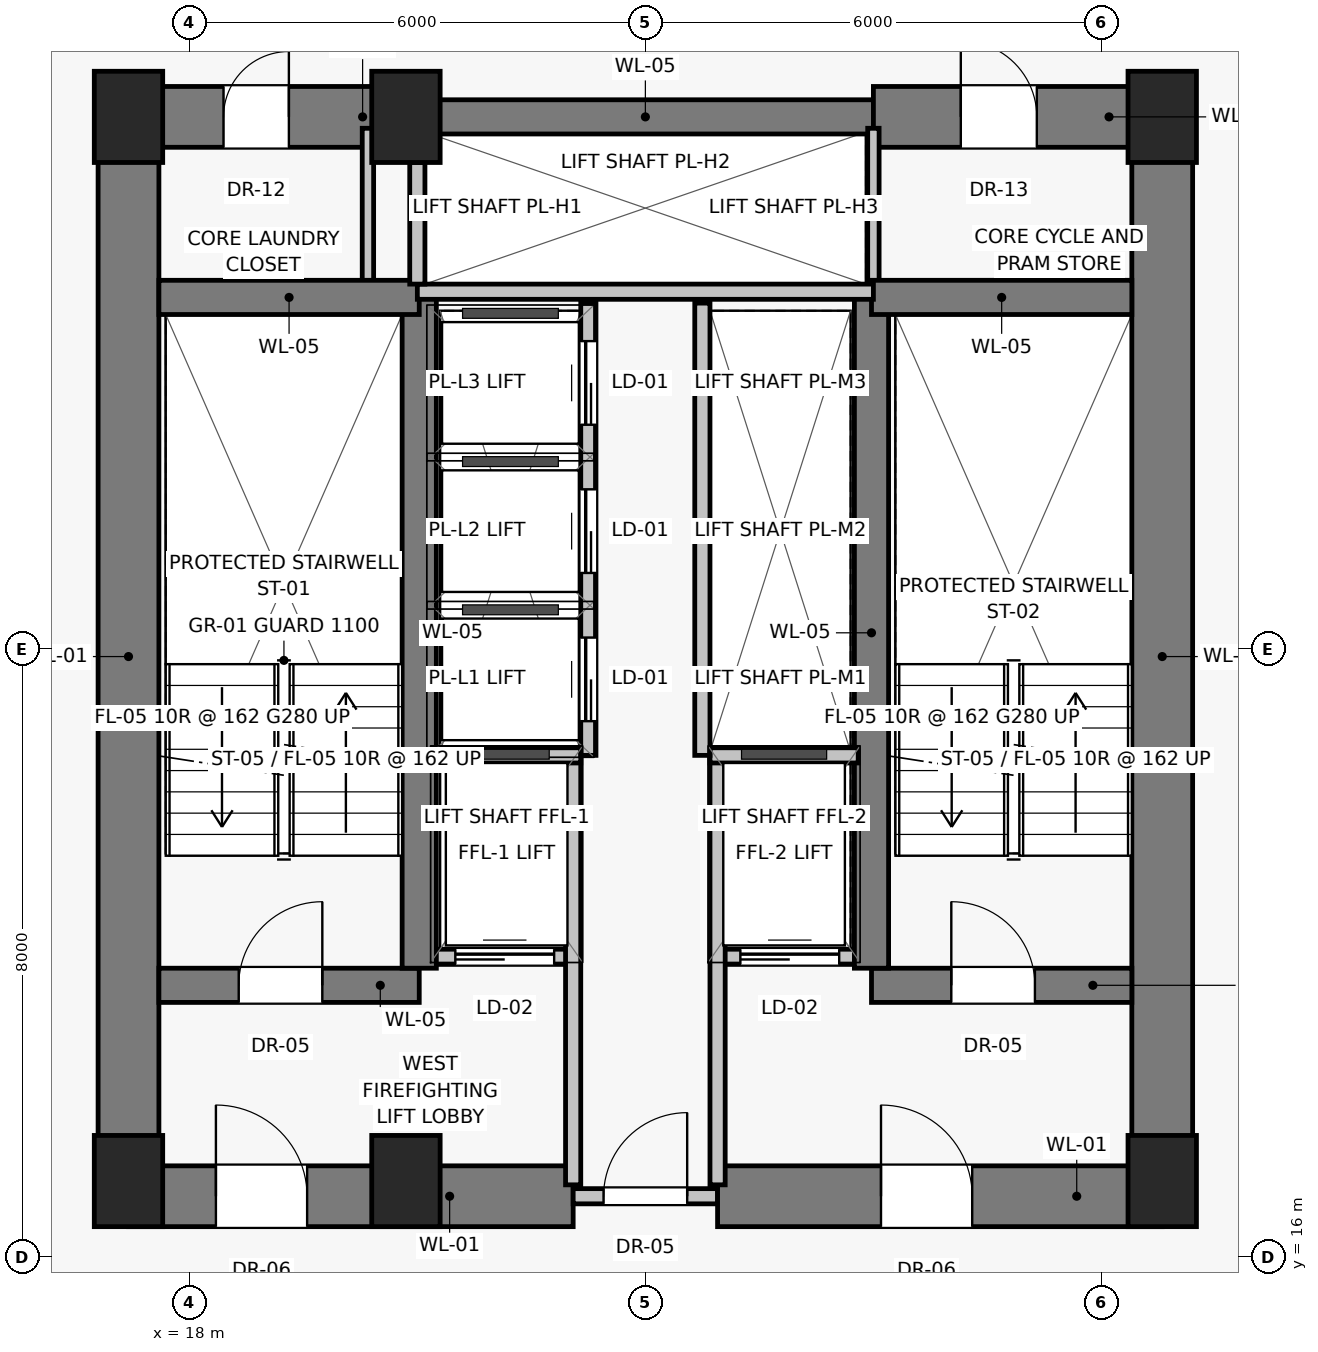
"""IFC4 building model, lengths in metres.
Left out: names, types, materials, properties, quantities, classifications, styles, units other than length and angle.
Written with IfcOpenShell. Run it as: python <this file> out.ifc"""

import sys

from ifc_helpers import new_model, si_unit, direction, frame, frame_2d, origin, origin_2d, place, context, subcontext, project, spatial, rectangle, extrude, source, transform, mapped, element, fill, save


model = new_model("IFC4")
c1 = context("Model", 3, precision=1e-05, world=origin(), true_north=direction((0.0, 1.0)))
c2 = subcontext(c1, "Body", "Model", "MODEL_VIEW")
j1 = project(units=[si_unit("LENGTHUNIT", "METRE"), si_unit("PLANEANGLEUNIT", "RADIAN")], contexts=[c1])
p1 = place(None, origin())
s1 = spatial("IfcSite", under=j1, at=p1, CompositionType="ELEMENT")
p2 = place(p1, origin())
s2 = spatial("IfcBuilding", under=s1, at=p2, CompositionType="ELEMENT")
p3 = place(p2, frame((0.0, 0.0, 70.6)))
s3 = spatial("IfcBuildingStorey", under=s2, at=p3, CompositionType="ELEMENT", Elevation=70.6)
for number, where, z_axis, x_axis in (
    (1, (17.2, 17.0, 0.0), (0.0, 0.0, 1.0), (1.0, 0.0, 0.0)),
    (2, (20.85, 17.0, 0.0), (0.0, 0.0, 1.0), (1.0, 0.0, 0.0)),
    (3, (30.8, 17.0, 0.0), (0.0, 0.0, 1.0), (1.0, 0.0, 0.0)),
    (4, (17.2, 31.0, 0.0), (0.0, 0.0, 1.0), (1.0, 0.0, 0.0)),
    (5, (20.85, 31.0, 0.0), (0.0, 0.0, 1.0), (1.0, 0.0, 0.0)),
    (6, (30.8, 31.0, 0.0), (0.0, 0.0, 1.0), (1.0, 0.0, 0.0)),
):
    element("IfcColumn", number, at=place(p3, frame(where, z_axis=z_axis, x_axis=x_axis)), inside=s3, PredefinedType="PILASTER", context=c2, shape_type="SweptSolid", body=[
        extrude(rectangle(XDim=0.9, YDim=1.2, at=origin_2d()), origin(), (0.0, 0.0, 1.0), 3.25),
    ])
for number, where, z_axis, x_axis in (
    (7, (17.2, 16.8, 0.0), (0.0, 0.0, 1.0), (0.0, 1.0, 0.0)),
    (8, (30.8, 16.8, 0.0), (0.0, 0.0, 1.0), (0.0, 1.0, 0.0)),
):
    element("IfcWall", number, at=place(p3, frame(where, z_axis=z_axis, x_axis=x_axis)), inside=s3, PredefinedType="SHEAR", context=c2, shape_type="SweptSolid", body=[
        extrude(rectangle(XDim=14.2, YDim=0.8, at=frame_2d((7.1, 0.0))), origin(), (0.0, 0.0, 1.0), 3.0),
    ])
p4 = place(p3, frame((17.2, 16.8, 0.0), z_axis=(0.0, 0.0, 1.0), x_axis=(1.0, 0.0, 0.0)))
e9 = element("IfcWall", 9, at=p4, inside=s3, PredefinedType="SHEAR", context=c2, shape_type="SweptSolid", body=[
    extrude(rectangle(XDim=5.85, YDim=0.8, at=frame_2d((2.925, 0.0))), origin(), (0.0, 0.0, 1.0), 3.0),
])
p5 = place(p4, frame((1.15, 0.0, 0.0)))
e10 = element("IfcOpeningElement", 10, at=p5, cuts=e9, PredefinedType="OPENING", context=c2, shape_type="SweptSolid", body=[
    extrude(rectangle(XDim=1.2, YDim=2.03, at=frame_2d((0.6, 1.015))), frame((0.0, 0.41, 0.0), z_axis=(0.0, -1.0, 0.0), x_axis=(1.0, 0.0, 0.0)), (0.0, 0.0, 1.0), 0.82),
])
p6 = place(p3, frame((23.05, 16.8, 0.0), z_axis=(0.0, 0.0, 1.0), x_axis=(1.0, 0.0, 0.0)))
e11 = element("IfcWall", 11, at=p6, inside=s3, PredefinedType="SOLIDWALL", context=c2, shape_type="SweptSolid", body=[
    extrude(rectangle(XDim=1.9, YDim=0.2, at=frame_2d((0.95, 0.0))), origin(), (0.0, 0.0, 1.0), 2.15),
])
p7 = place(p6, frame((0.4, 0.0, 0.0)))
e12 = element("IfcOpeningElement", 12, at=p7, cuts=e11, PredefinedType="OPENING", context=c2, shape_type="SweptSolid", body=[
    extrude(rectangle(XDim=1.1, YDim=2.03, at=frame_2d((0.55, 1.015))), frame((0.0, 0.11, 0.0), z_axis=(0.0, -1.0, 0.0), x_axis=(1.0, 0.0, 0.0)), (0.0, 0.0, 1.0), 0.22),
])
p8 = place(p3, frame((24.95, 16.8, 0.0), z_axis=(0.0, 0.0, 1.0), x_axis=(1.0, 0.0, 0.0)))
e13 = element("IfcWall", 13, at=p8, inside=s3, PredefinedType="SHEAR", context=c2, shape_type="SweptSolid", body=[
    extrude(rectangle(XDim=5.85, YDim=0.8, at=frame_2d((2.925, 0.0))), origin(), (0.0, 0.0, 1.0), 3.0),
])
p9 = place(p8, frame((2.15, 0.0, 0.0)))
e14 = element("IfcOpeningElement", 14, at=p9, cuts=e13, PredefinedType="OPENING", context=c2, shape_type="SweptSolid", body=[
    extrude(rectangle(XDim=1.2, YDim=2.03, at=frame_2d((0.6, 1.015))), frame((0.0, 0.41, 0.0), z_axis=(0.0, -1.0, 0.0), x_axis=(1.0, 0.0, 0.0)), (0.0, 0.0, 1.0), 0.82),
])
p10 = place(p3, frame((17.2, 31.0, 0.0), z_axis=(0.0, 0.0, 1.0), x_axis=(1.0, 0.0, 0.0)))
e15 = element("IfcWall", 15, at=p10, inside=s3, PredefinedType="SHEAR", context=c2, shape_type="SweptSolid", body=[
    extrude(rectangle(XDim=3.8, YDim=0.8, at=frame_2d((1.9, 0.0))), origin(), (0.0, 0.0, 1.0), 3.0),
])
p11 = place(p10, frame((1.25, 0.0, 0.0)))
e16 = element("IfcOpeningElement", 16, at=p11, cuts=e15, PredefinedType="OPENING", context=c2, shape_type="SweptSolid", body=[
    extrude(rectangle(XDim=0.86, YDim=2.01, at=frame_2d((0.43, 1.005))), frame((0.0, 0.41, 0.0), z_axis=(0.0, -1.0, 0.0), x_axis=(1.0, 0.0, 0.0)), (0.0, 0.0, 1.0), 0.82),
])
p12 = place(p3, frame((21.0, 31.0, 0.0), z_axis=(0.0, 0.0, 1.0), x_axis=(1.0, 0.0, 0.0)))
e17 = element("IfcWall", 17, at=p12, inside=s3, PredefinedType="SHEAR", context=c2, shape_type="SweptSolid", body=[
    extrude(rectangle(XDim=6.0, YDim=0.45, at=frame_2d((3.0, 0.0))), origin(), (0.0, 0.0, 1.0), 3.0),
])
p13 = place(p3, frame((27.0, 31.0, 0.0), z_axis=(0.0, 0.0, 1.0), x_axis=(1.0, 0.0, 0.0)))
e18 = element("IfcWall", 18, at=p13, inside=s3, PredefinedType="SHEAR", context=c2, shape_type="SweptSolid", body=[
    extrude(rectangle(XDim=3.8, YDim=0.8, at=frame_2d((1.9, 0.0))), origin(), (0.0, 0.0, 1.0), 3.0),
])
p14 = place(p13, frame((1.15, 0.0, 0.0)))
e19 = element("IfcOpeningElement", 19, at=p14, cuts=e18, PredefinedType="OPENING", context=c2, shape_type="SweptSolid", body=[
    extrude(rectangle(XDim=1.0, YDim=2.01, at=frame_2d((0.5, 1.005))), frame((0.0, 0.41, 0.0), z_axis=(0.0, -1.0, 0.0), x_axis=(1.0, 0.0, 0.0)), (0.0, 0.0, 1.0), 0.82),
])
for number, where, z_axis, x_axis in (
    (20, (20.35, 28.65, 0.0), (0.0, 0.0, 1.0), (0.0, 1.0, 0.0)),
    (21, (27.0, 28.65, 0.0), (0.0, 0.0, 1.0), (0.0, 1.0, 0.0)),
):
    element("IfcWall", number, at=place(p3, frame(where, z_axis=z_axis, x_axis=x_axis)), inside=s3, PredefinedType="PARTITIONING", context=c2, shape_type="SweptSolid", body=[
        extrude(rectangle(XDim=2.2, YDim=0.15, at=frame_2d((1.1, 0.0))), origin(), (0.0, 0.0, 1.0), 3.0),
    ])
p15 = place(p3, frame((17.6, 19.575, 0.0), z_axis=(0.0, 0.0, 1.0), x_axis=(1.0, 0.0, 0.0)))
e22 = element("IfcWall", 22, at=p15, inside=s3, PredefinedType="SHEAR", context=c2, shape_type="SweptSolid", body=[
    extrude(rectangle(XDim=3.425, YDim=0.45, at=frame_2d((1.712, 0.0))), origin(), (0.0, 0.0, 1.0), 3.0),
])
p16 = place(p15, frame((1.05, 0.0, 0.0)))
e23 = element("IfcOpeningElement", 23, at=p16, cuts=e22, PredefinedType="OPENING", context=c2, shape_type="SweptSolid", body=[
    extrude(rectangle(XDim=1.1, YDim=2.03, at=frame_2d((0.55, 1.015))), frame((0.0, 0.235, 0.0), z_axis=(0.0, -1.0, 0.0), x_axis=(1.0, 0.0, 0.0)), (0.0, 0.0, 1.0), 0.47),
])
p17 = place(p3, frame((21.2, 19.95, 0.0), z_axis=(0.0, 0.0, 1.0), x_axis=(1.0, 0.0, 0.0)))
e24 = element("IfcWall", 24, at=p17, inside=s3, PredefinedType="SOLIDWALL", context=c2, shape_type="SweptSolid", body=[
    extrude(rectangle(XDim=1.85, YDim=0.2, at=frame_2d((0.925, 0.0))), origin(), (0.0, 0.0, 1.0), 3.0),
])
p18 = place(p17, frame((0.3, 0.0, 0.0)))
e25 = element("IfcOpeningElement", 25, at=p18, cuts=e24, PredefinedType="OPENING", context=c2, shape_type="SweptSolid", body=[
    extrude(rectangle(XDim=1.3, YDim=2.25, at=frame_2d((0.65, 1.125))), frame((0.0, 0.11, 0.0), z_axis=(0.0, -1.0, 0.0), x_axis=(1.0, 0.0, 0.0)), (0.0, 0.0, 1.0), 0.22),
])
p19 = place(p3, frame((24.95, 19.95, 0.0), z_axis=(0.0, 0.0, 1.0), x_axis=(1.0, 0.0, 0.0)))
e26 = element("IfcWall", 26, at=p19, inside=s3, PredefinedType="SOLIDWALL", context=c2, shape_type="SweptSolid", body=[
    extrude(rectangle(XDim=1.85, YDim=0.2, at=frame_2d((0.925, 0.0))), origin(), (0.0, 0.0, 1.0), 3.0),
])
p20 = place(p19, frame((0.3, 0.0, 0.0)))
e27 = element("IfcOpeningElement", 27, at=p20, cuts=e26, PredefinedType="OPENING", context=c2, shape_type="SweptSolid", body=[
    extrude(rectangle(XDim=1.3, YDim=2.25, at=frame_2d((0.65, 1.125))), frame((0.0, 0.11, 0.0), z_axis=(0.0, -1.0, 0.0), x_axis=(1.0, 0.0, 0.0)), (0.0, 0.0, 1.0), 0.22),
])
p21 = place(p3, frame((26.975, 19.575, 0.0), z_axis=(0.0, 0.0, 1.0), x_axis=(1.0, 0.0, 0.0)))
e28 = element("IfcWall", 28, at=p21, inside=s3, PredefinedType="SHEAR", context=c2, shape_type="SweptSolid", body=[
    extrude(rectangle(XDim=3.425, YDim=0.45, at=frame_2d((1.712, 0.0))), origin(), (0.0, 0.0, 1.0), 3.0),
])
p22 = place(p21, frame((1.05, 0.0, 0.0)))
e29 = element("IfcOpeningElement", 29, at=p22, cuts=e28, PredefinedType="OPENING", context=c2, shape_type="SweptSolid", body=[
    extrude(rectangle(XDim=1.1, YDim=2.03, at=frame_2d((0.55, 1.015))), frame((0.0, 0.235, 0.0), z_axis=(0.0, -1.0, 0.0), x_axis=(1.0, 0.0, 0.0)), (0.0, 0.0, 1.0), 0.47),
])
for number, where, z_axis, x_axis in (
    (30, (21.025, 19.8, 0.0), (0.0, 0.0, 1.0), (0.0, 1.0, 0.0)),
    (31, (26.975, 19.8, 0.0), (0.0, 0.0, 1.0), (0.0, 1.0, 0.0)),
):
    element("IfcWall", number, at=place(p3, frame(where, z_axis=z_axis, x_axis=x_axis)), inside=s3, PredefinedType="SHEAR", context=c2, shape_type="SweptSolid", body=[
        extrude(rectangle(XDim=8.825, YDim=0.45, at=frame_2d((4.413, 0.0))), origin(), (0.0, 0.0, 1.0), 3.0),
    ])
for number, where, z_axis, x_axis in (
    (32, (17.6, 28.625, 0.0), (0.0, 0.0, 1.0), (1.0, 0.0, 0.0)),
    (33, (26.975, 28.625, 0.0), (0.0, 0.0, 1.0), (1.0, 0.0, 0.0)),
):
    element("IfcWall", number, at=place(p3, frame(where, z_axis=z_axis, x_axis=x_axis)), inside=s3, PredefinedType="SHEAR", context=c2, shape_type="SweptSolid", body=[
        extrude(rectangle(XDim=3.425, YDim=0.45, at=frame_2d((1.712, 0.0))), origin(), (0.0, 0.0, 1.0), 3.0),
    ])
for number, where, z_axis, x_axis in (
    (34, (23.05, 16.95, 0.0), (0.0, 0.0, 1.0), (0.0, 1.0, 0.0)),
    (35, (24.95, 16.95, 0.0), (0.0, 0.0, 1.0), (0.0, 1.0, 0.0)),
):
    element("IfcWall", number, at=place(p3, frame(where, z_axis=z_axis, x_axis=x_axis)), inside=s3, PredefinedType="SOLIDWALL", context=c2, shape_type="SweptSolid", body=[
        extrude(rectangle(XDim=5.6, YDim=0.2, at=frame_2d((2.8, 0.0))), origin(), (0.0, 0.0, 1.0), 3.0),
    ])
for number, where, z_axis, x_axis in (
    (36, (21.2, 22.6, 0.0), (0.0, 0.0, 1.0), (1.0, 0.0, 0.0)),
    (37, (24.85, 22.6, 0.0), (0.0, 0.0, 1.0), (1.0, 0.0, 0.0)),
):
    element("IfcWall", number, at=place(p3, frame(where, z_axis=z_axis, x_axis=x_axis)), inside=s3, PredefinedType="SOLIDWALL", context=c2, shape_type="SweptSolid", body=[
        extrude(rectangle(XDim=1.95, YDim=0.2, at=frame_2d((0.975, 0.0))), origin(), (0.0, 0.0, 1.0), 3.0),
    ])
p23 = place(p3, frame((21.0, 28.7, 0.0), z_axis=(0.0, 0.0, 1.0), x_axis=(1.0, 0.0, 0.0)))
e38 = element("IfcWall", 38, at=p23, inside=s3, PredefinedType="SOLIDWALL", context=c2, shape_type="SweptSolid", body=[
    extrude(rectangle(XDim=6.0, YDim=0.2, at=frame_2d((3.0, 0.0))), origin(), (0.0, 0.0, 1.0), 3.0),
])
p24 = place(p3, frame((21.0, 28.8, 0.0), z_axis=(0.0, 0.0, 1.0), x_axis=(0.0, 1.0, 0.0)))
e39 = element("IfcWall", 39, at=p24, inside=s3, PredefinedType="SOLIDWALL", context=c2, shape_type="SweptSolid", body=[
    extrude(rectangle(XDim=1.6, YDim=0.2, at=frame_2d((0.8, 0.0))), origin(), (0.0, 0.0, 1.0), 3.0),
])
p25 = place(p3, frame((23.25, 22.6, 0.0), z_axis=(0.0, 0.0, 1.0), x_axis=(0.0, 1.0, 0.0)))
e40 = element("IfcWall", 40, at=p25, inside=s3, PredefinedType="SOLIDWALL", context=c2, shape_type="SweptSolid", body=[
    extrude(rectangle(XDim=5.95, YDim=0.2, at=frame_2d((2.975, 0.0))), origin(), (0.0, 0.0, 1.0), 3.0),
])
p26 = place(p25, frame((0.45, 0.0, 0.0)))
e41 = element("IfcOpeningElement", 41, at=p26, cuts=e40, PredefinedType="OPENING", context=c2, shape_type="SweptSolid", body=[
    extrude(rectangle(XDim=1.1, YDim=2.08, at=frame_2d((0.55, 1.04))), frame((0.0, 0.11, 0.0), z_axis=(0.0, -1.0, 0.0), x_axis=(1.0, 0.0, 0.0)), (0.0, 0.0, 1.0), 0.22),
])
p27 = place(p25, frame((2.4, 0.0, 0.0)))
e42 = element("IfcOpeningElement", 42, at=p27, cuts=e40, PredefinedType="OPENING", context=c2, shape_type="SweptSolid", body=[
    extrude(rectangle(XDim=1.1, YDim=2.08, at=frame_2d((0.55, 1.04))), frame((0.0, 0.11, 0.0), z_axis=(0.0, -1.0, 0.0), x_axis=(1.0, 0.0, 0.0)), (0.0, 0.0, 1.0), 0.22),
])
p28 = place(p25, frame((4.35, 0.0, 0.0)))
e43 = element("IfcOpeningElement", 43, at=p28, cuts=e40, PredefinedType="OPENING", context=c2, shape_type="SweptSolid", body=[
    extrude(rectangle(XDim=1.1, YDim=2.08, at=frame_2d((0.55, 1.04))), frame((0.0, 0.11, 0.0), z_axis=(0.0, -1.0, 0.0), x_axis=(1.0, 0.0, 0.0)), (0.0, 0.0, 1.0), 0.22),
])
p29 = place(p3, frame((24.75, 22.6, 0.0), z_axis=(0.0, 0.0, 1.0), x_axis=(0.0, 1.0, 0.0)))
e44 = element("IfcWall", 44, at=p29, inside=s3, PredefinedType="SOLIDWALL", context=c2, shape_type="SweptSolid", body=[
    extrude(rectangle(XDim=5.95, YDim=0.2, at=frame_2d((2.975, 0.0))), origin(), (0.0, 0.0, 1.0), 3.0),
])
m1 = source(origin(), c2, "Body", "SweptSolid", [
    extrude(rectangle(XDim=1.2, YDim=2.03, at=frame_2d((0.6, 1.015))), frame((0.0, 0.025, 0.0), z_axis=(0.0, -1.0, 0.0), x_axis=(1.0, 0.0, 0.0)), (0.0, 0.0, 1.0), 0.05),
])
p30 = place(p5, origin())
e45 = element("IfcDoor", 45, at=p30, inside=s3, OperationType="SINGLE_SWING_LEFT", PredefinedType="DOOR", context=c2, shape_type="MappedRepresentation", body=[
    mapped(m1, transform((0.0, 0.0, 0.0), scale=1.0)),
])
fill(e10, e45)
m2 = source(origin(), c2, "Body", "SweptSolid", [
    extrude(rectangle(XDim=1.1, YDim=2.03, at=frame_2d((0.55, 1.015))), frame((0.0, 0.025, 0.0), z_axis=(0.0, -1.0, 0.0), x_axis=(1.0, 0.0, 0.0)), (0.0, 0.0, 1.0), 0.05),
])
p31 = place(p7, origin())
e46 = element("IfcDoor", 46, at=p31, inside=s3, OperationType="SINGLE_SWING_RIGHT", PredefinedType="DOOR", context=c2, shape_type="MappedRepresentation", body=[
    mapped(m2, transform((0.0, 0.0, 0.0), scale=1.0)),
])
fill(e12, e46)
p32 = place(p9, origin())
e47 = element("IfcDoor", 47, at=p32, inside=s3, OperationType="SINGLE_SWING_LEFT", PredefinedType="DOOR", context=c2, shape_type="MappedRepresentation", body=[
    mapped(m1, transform((0.0, 0.0, 0.0), scale=1.0)),
])
fill(e14, e47)
m3 = source(origin(), c2, "Body", "SweptSolid", [
    extrude(rectangle(XDim=0.86, YDim=2.01, at=frame_2d((0.43, 1.005))), frame((0.0, 0.025, 0.0), z_axis=(0.0, -1.0, 0.0), x_axis=(1.0, 0.0, 0.0)), (0.0, 0.0, 1.0), 0.05),
])
p33 = place(p11, origin())
e48 = element("IfcDoor", 48, at=p33, inside=s3, OperationType="SINGLE_SWING_RIGHT", PredefinedType="DOOR", context=c2, shape_type="MappedRepresentation", body=[
    mapped(m3, transform((0.0, 0.0, 0.0), scale=1.0)),
])
fill(e16, e48)
m4 = source(origin(), c2, "Body", "SweptSolid", [
    extrude(rectangle(XDim=1.0, YDim=2.01, at=frame_2d((0.5, 1.005))), frame((0.0, 0.025, 0.0), z_axis=(0.0, -1.0, 0.0), x_axis=(1.0, 0.0, 0.0)), (0.0, 0.0, 1.0), 0.05),
])
p34 = place(p14, origin())
e49 = element("IfcDoor", 49, at=p34, inside=s3, OperationType="SINGLE_SWING_LEFT", PredefinedType="DOOR", context=c2, shape_type="MappedRepresentation", body=[
    mapped(m4, transform((0.0, 0.0, 0.0), scale=1.0)),
])
fill(e19, e49)
p35 = place(p16, origin())
e50 = element("IfcDoor", 50, at=p35, inside=s3, OperationType="SINGLE_SWING_RIGHT", PredefinedType="DOOR", context=c2, shape_type="MappedRepresentation", body=[
    mapped(m2, transform((0.0, 0.0, 0.0), scale=1.0)),
])
fill(e23, e50)
m5 = source(origin(), c2, "Body", "SweptSolid", [
    extrude(rectangle(XDim=1.3, YDim=2.25, at=frame_2d((0.65, 1.125))), frame((0.0, 0.025, 0.0), z_axis=(0.0, -1.0, 0.0), x_axis=(1.0, 0.0, 0.0)), (0.0, 0.0, 1.0), 0.05),
])
p36 = place(p18, origin())
e51 = element("IfcDoor", 51, at=p36, inside=s3, OperationType="SLIDING_TO_LEFT", PredefinedType="DOOR", context=c2, shape_type="MappedRepresentation", body=[
    mapped(m5, transform((0.0, 0.0, 0.0), scale=1.0)),
])
fill(e25, e51)
p37 = place(p20, origin())
e52 = element("IfcDoor", 52, at=p37, inside=s3, OperationType="SLIDING_TO_LEFT", PredefinedType="DOOR", context=c2, shape_type="MappedRepresentation", body=[
    mapped(m5, transform((0.0, 0.0, 0.0), scale=1.0)),
])
fill(e27, e52)
p38 = place(p22, origin())
e53 = element("IfcDoor", 53, at=p38, inside=s3, OperationType="SINGLE_SWING_LEFT", PredefinedType="DOOR", context=c2, shape_type="MappedRepresentation", body=[
    mapped(m2, transform((0.0, 0.0, 0.0), scale=1.0)),
])
fill(e29, e53)
m6 = source(origin(), c2, "Body", "SweptSolid", [
    extrude(rectangle(XDim=1.1, YDim=2.08, at=frame_2d((0.55, 1.04))), frame((0.0, 0.025, 0.0), z_axis=(0.0, -1.0, 0.0), x_axis=(1.0, 0.0, 0.0)), (0.0, 0.0, 1.0), 0.05),
])
p39 = place(p26, origin())
e54 = element("IfcDoor", 54, at=p39, inside=s3, OperationType="SLIDING_TO_LEFT", PredefinedType="DOOR", context=c2, shape_type="MappedRepresentation", body=[
    mapped(m6, transform((0.0, 0.0, 0.0), scale=1.0)),
])
fill(e41, e54)
p40 = place(p27, origin())
e55 = element("IfcDoor", 55, at=p40, inside=s3, OperationType="SLIDING_TO_LEFT", PredefinedType="DOOR", context=c2, shape_type="MappedRepresentation", body=[
    mapped(m6, transform((0.0, 0.0, 0.0), scale=1.0)),
])
fill(e42, e55)
p41 = place(p28, origin())
e56 = element("IfcDoor", 56, at=p41, inside=s3, OperationType="SLIDING_TO_LEFT", PredefinedType="DOOR", context=c2, shape_type="MappedRepresentation", body=[
    mapped(m6, transform((0.0, 0.0, 0.0), scale=1.0)),
])
fill(e43, e56)
save(model, sys.argv[1])
